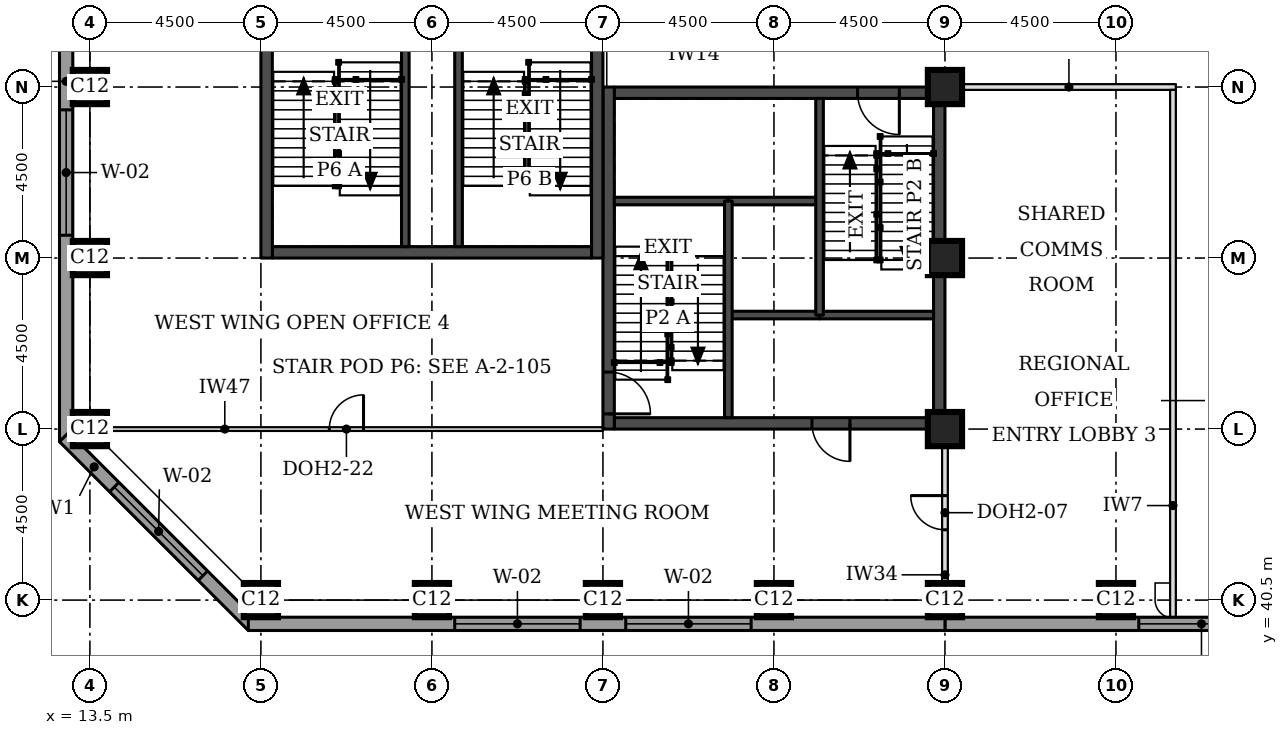
"""IFC4 building model, lengths in metres.
Left out: names, types, materials, properties, quantities, classifications, styles, units other than length and angle.
Written with IfcOpenShell. Run it as: python <this file> out.ifc"""

import sys

from ifc_helpers import new_model, si_unit, direction, frame, frame_2d, origin, origin_2d, place, context, subcontext, project, spatial, rectangle, extrude, element, fill, save


model = new_model("IFC4")
c1 = context("Model", 3, precision=1e-05, world=origin(), true_north=direction((0.0, 1.0)))
c2 = subcontext(c1, "Body", "Model", "MODEL_VIEW")
j1 = project(units=[si_unit("LENGTHUNIT", "METRE"), si_unit("PLANEANGLEUNIT", "RADIAN")], contexts=[c1])
p1 = place(None, origin())
s1 = spatial("IfcSite", under=j1, at=p1, CompositionType="ELEMENT")
p2 = place(p1, origin())
s2 = spatial("IfcBuilding", under=s1, at=p2, CompositionType="ELEMENT")
p3 = place(p2, frame((0.0, 0.0, 158.8)))
s3 = spatial("IfcBuildingStorey", under=s2, at=p3, CompositionType="ELEMENT", Elevation=158.8)
for number, where, z_axis, x_axis in (
    (1, (18.0, 40.5, 0.0), (0.0, 0.0, 1.0), (1.0, 0.0, 0.0)),
    (2, (22.5, 40.5, 0.0), (0.0, 0.0, 1.0), (1.0, 0.0, 0.0)),
    (3, (27.0, 40.5, 0.0), (0.0, 0.0, 1.0), (1.0, 0.0, 0.0)),
    (4, (31.5, 40.5, 0.0), (0.0, 0.0, 1.0), (1.0, 0.0, 0.0)),
    (5, (36.0, 40.5, 0.0), (0.0, 0.0, 1.0), (1.0, 0.0, 0.0)),
    (6, (40.5, 40.5, 0.0), (0.0, 0.0, 1.0), (1.0, 0.0, 0.0)),
    (7, (13.5, 45.0, 0.0), (0.0, 0.0, 1.0), (1.0, 0.0, 0.0)),
    (8, (36.0, 45.0, 0.0), (0.0, 0.0, 1.0), (1.0, 0.0, 0.0)),
    (9, (13.5, 49.5, 0.0), (0.0, 0.0, 1.0), (1.0, 0.0, 0.0)),
    (10, (36.0, 49.5, 0.0), (0.0, 0.0, 1.0), (1.0, 0.0, 0.0)),
    (11, (13.5, 54.0, 0.0), (0.0, 0.0, 1.0), (1.0, 0.0, 0.0)),
    (12, (36.0, 54.0, 0.0), (0.0, 0.0, 1.0), (1.0, 0.0, 0.0)),
):
    element("IfcColumn", number, at=place(p3, frame(where, z_axis=z_axis, x_axis=x_axis)), inside=s3, PredefinedType="COLUMN", context=c2, shape_type="SweptSolid", body=[
        extrude(rectangle(XDim=0.9, YDim=0.9, at=origin_2d()), origin(), (0.0, 0.0, 1.0), 3.7),
    ])
p4 = place(p3, frame((27.3, 45.15, 0.0), z_axis=(0.0, 0.0, 1.0), x_axis=(1.0, 0.0, 0.0)))
e13 = element("IfcWall", 13, at=p4, inside=s3, PredefinedType="SHEAR", context=c2, shape_type="SweptSolid", body=[
    extrude(rectangle(XDim=8.4, YDim=0.3, at=frame_2d((4.2, 0.0))), origin(), (0.0, 0.0, 1.0), 3.7),
])
p5 = place(p4, frame((5.2, 0.0, 0.0)))
e14 = element("IfcOpeningElement", 14, at=p5, cuts=e13, PredefinedType="OPENING", context=c2, shape_type="SweptSolid", body=[
    extrude(rectangle(XDim=1.0, YDim=2.1, at=frame_2d((0.5, 1.05))), frame((0.0, 0.16, 0.0), z_axis=(0.0, -1.0, 0.0), x_axis=(1.0, 0.0, 0.0)), (0.0, 0.0, 1.0), 0.32),
])
p6 = place(p3, frame((27.3, 53.85, 0.0), z_axis=(0.0, 0.0, 1.0), x_axis=(1.0, 0.0, 0.0)))
e15 = element("IfcWall", 15, at=p6, inside=s3, PredefinedType="SHEAR", context=c2, shape_type="SweptSolid", body=[
    extrude(rectangle(XDim=8.4, YDim=0.3, at=frame_2d((4.2, 0.0))), origin(), (0.0, 0.0, 1.0), 3.7),
])
p7 = place(p6, frame((6.4, 0.0, 0.0)))
e16 = element("IfcOpeningElement", 16, at=p7, cuts=e15, PredefinedType="OPENING", context=c2, shape_type="SweptSolid", body=[
    extrude(rectangle(XDim=1.1, YDim=2.1, at=frame_2d((0.55, 1.05))), frame((0.0, 0.16, 0.0), z_axis=(0.0, -1.0, 0.0), x_axis=(1.0, 0.0, 0.0)), (0.0, 0.0, 1.0), 0.32),
])
p8 = place(p3, frame((27.15, 45.0, 0.0), z_axis=(0.0, 0.0, 1.0), x_axis=(0.0, 1.0, 0.0)))
e17 = element("IfcWall", 17, at=p8, inside=s3, PredefinedType="SHEAR", context=c2, shape_type="SweptSolid", body=[
    extrude(rectangle(XDim=9.0, YDim=0.3, at=frame_2d((4.5, 0.0))), origin(), (0.0, 0.0, 1.0), 3.7),
])
p9 = place(p8, frame((0.4, 0.0, 0.0)))
e18 = element("IfcOpeningElement", 18, at=p9, cuts=e17, PredefinedType="OPENING", context=c2, shape_type="SweptSolid", body=[
    extrude(rectangle(XDim=1.1, YDim=2.1, at=frame_2d((0.55, 1.05))), frame((0.0, 0.16, 0.0), z_axis=(0.0, -1.0, 0.0), x_axis=(1.0, 0.0, 0.0)), (0.0, 0.0, 1.0), 0.32),
])
p10 = place(p3, frame((35.85, 45.0, 0.0), z_axis=(0.0, 0.0, 1.0), x_axis=(0.0, 1.0, 0.0)))
e19 = element("IfcWall", 19, at=p10, inside=s3, PredefinedType="SHEAR", context=c2, shape_type="SweptSolid", body=[
    extrude(rectangle(XDim=9.0, YDim=0.3, at=frame_2d((4.5, 0.0))), origin(), (0.0, 0.0, 1.0), 3.7),
])
p11 = place(p3, frame((18.3, 49.65, 0.0), z_axis=(0.0, 0.0, 1.0), x_axis=(1.0, 0.0, 0.0)))
e20 = element("IfcWall", 20, at=p11, inside=s3, PredefinedType="SHEAR", context=c2, shape_type="SweptSolid", body=[
    extrude(rectangle(XDim=8.4, YDim=0.3, at=frame_2d((4.2, 0.0))), origin(), (0.0, 0.0, 1.0), 3.7),
])
p12 = place(p3, frame((18.15, 49.5, 0.0), z_axis=(0.0, 0.0, 1.0), x_axis=(0.0, 1.0, 0.0)))
e21 = element("IfcWall", 21, at=p12, inside=s3, PredefinedType="SHEAR", context=c2, shape_type="SweptSolid", body=[
    extrude(rectangle(XDim=9.0, YDim=0.3, at=frame_2d((4.5, 0.0))), origin(), (0.0, 0.0, 1.0), 3.7),
])
p13 = place(p3, frame((26.85, 49.5, 0.0), z_axis=(0.0, 0.0, 1.0), x_axis=(0.0, 1.0, 0.0)))
e22 = element("IfcWall", 22, at=p13, inside=s3, PredefinedType="SHEAR", context=c2, shape_type="SweptSolid", body=[
    extrude(rectangle(XDim=9.0, YDim=0.3, at=frame_2d((4.5, 0.0))), origin(), (0.0, 0.0, 1.0), 3.7),
])
p14 = place(p13, frame((6.6, 0.0, 0.0)))
e23 = element("IfcOpeningElement", 23, at=p14, cuts=e22, PredefinedType="OPENING", context=c2, shape_type="SweptSolid", body=[
    extrude(rectangle(XDim=1.8, YDim=2.1, at=frame_2d((0.9, 1.05))), frame((0.0, 0.16, 0.0), z_axis=(0.0, -1.0, 0.0), x_axis=(1.0, 0.0, 0.0)), (0.0, 0.0, 1.0), 0.32),
])
p15 = place(p3, frame((36.0, 39.875, 0.0), z_axis=(0.0, 0.0, 1.0), x_axis=(1.0, 0.0, 0.0)))
e24 = element("IfcWall", 24, at=p15, inside=s3, PredefinedType="STANDARD", context=c2, shape_type="SweptSolid", body=[
    extrude(rectangle(XDim=36.331, YDim=0.35, at=frame_2d((18.166, 0.0))), origin(), (0.0, 0.0, 1.0), 3.525),
])
p16 = place(p15, frame((5.1, 0.0, 0.9)))
e25 = element("IfcOpeningElement", 25, at=p16, cuts=e24, PredefinedType="OPENING", context=c2, shape_type="SweptSolid", body=[
    extrude(rectangle(XDim=3.3, YDim=1.9, at=frame_2d((1.65, 0.95))), frame((0.0, 0.185, 0.0), z_axis=(0.0, -1.0, 0.0), x_axis=(1.0, 0.0, 0.0)), (0.0, 0.0, 1.0), 0.37),
])
p17 = place(p15, frame((9.6, 0.0, 0.9)))
e26 = element("IfcOpeningElement", 26, at=p17, cuts=e24, PredefinedType="OPENING", context=c2, shape_type="SweptSolid", body=[
    extrude(rectangle(XDim=3.3, YDim=1.9, at=frame_2d((1.65, 0.95))), frame((0.0, 0.185, 0.0), z_axis=(0.0, -1.0, 0.0), x_axis=(1.0, 0.0, 0.0)), (0.0, 0.0, 1.0), 0.37),
])
p18 = place(p15, frame((14.1, 0.0, 0.9)))
e27 = element("IfcOpeningElement", 27, at=p18, cuts=e24, PredefinedType="OPENING", context=c2, shape_type="SweptSolid", body=[
    extrude(rectangle(XDim=3.3, YDim=1.9, at=frame_2d((1.65, 0.95))), frame((0.0, 0.185, 0.0), z_axis=(0.0, -1.0, 0.0), x_axis=(1.0, 0.0, 0.0)), (0.0, 0.0, 1.0), 0.37),
])
p19 = place(p15, frame((18.6, 0.0, 0.9)))
e28 = element("IfcOpeningElement", 28, at=p19, cuts=e24, PredefinedType="OPENING", context=c2, shape_type="SweptSolid", body=[
    extrude(rectangle(XDim=3.3, YDim=1.9, at=frame_2d((1.65, 0.95))), frame((0.0, 0.185, 0.0), z_axis=(0.0, -1.0, 0.0), x_axis=(1.0, 0.0, 0.0)), (0.0, 0.0, 1.0), 0.37),
])
p20 = place(p15, frame((23.1, 0.0, 0.9)))
e29 = element("IfcOpeningElement", 29, at=p20, cuts=e24, PredefinedType="OPENING", context=c2, shape_type="SweptSolid", body=[
    extrude(rectangle(XDim=3.3, YDim=1.9, at=frame_2d((1.65, 0.95))), frame((0.0, 0.185, 0.0), z_axis=(0.0, -1.0, 0.0), x_axis=(1.0, 0.0, 0.0)), (0.0, 0.0, 1.0), 0.37),
])
p21 = place(p15, frame((27.6, 0.0, 0.9)))
e30 = element("IfcOpeningElement", 30, at=p21, cuts=e24, PredefinedType="OPENING", context=c2, shape_type="SweptSolid", body=[
    extrude(rectangle(XDim=3.3, YDim=1.9, at=frame_2d((1.65, 0.95))), frame((0.0, 0.185, 0.0), z_axis=(0.0, -1.0, 0.0), x_axis=(1.0, 0.0, 0.0)), (0.0, 0.0, 1.0), 0.37),
])
p22 = place(p3, frame((12.875, 58.831, 0.0), z_axis=(0.0, 0.0, 1.0), x_axis=(0.0, -1.0, 0.0)))
e31 = element("IfcWall", 31, at=p22, inside=s3, PredefinedType="STANDARD", context=c2, shape_type="SweptSolid", body=[
    extrude(rectangle(XDim=14.163, YDim=0.35, at=frame_2d((7.081, 0.0))), origin(), (0.0, 0.0, 1.0), 3.525),
])
p23 = place(p22, frame((5.431, 0.0, 0.9)))
e32 = element("IfcOpeningElement", 32, at=p23, cuts=e31, PredefinedType="OPENING", context=c2, shape_type="SweptSolid", body=[
    extrude(rectangle(XDim=3.3, YDim=1.9, at=frame_2d((1.65, 0.95))), frame((0.0, 0.185, 0.0), z_axis=(0.0, -1.0, 0.0), x_axis=(1.0, 0.0, 0.0)), (0.0, 0.0, 1.0), 0.37),
])
p24 = place(p3, frame((12.824, 44.792, 0.0), z_axis=(0.0, 0.0, 1.0), x_axis=(0.707106781187, -0.707106781187, 0.0)))
e33 = element("IfcWall", 33, at=p24, inside=s3, PredefinedType="STANDARD", context=c2, shape_type="SweptSolid", body=[
    extrude(rectangle(XDim=7.027, YDim=0.35, at=frame_2d((3.513, 0.0))), origin(), (0.0, 0.0, 1.0), 3.525),
])
p25 = place(p24, frame((1.863, 0.0, 0.9)))
e34 = element("IfcOpeningElement", 34, at=p25, cuts=e33, PredefinedType="OPENING", context=c2, shape_type="SweptSolid", body=[
    extrude(rectangle(XDim=3.3, YDim=1.9, at=frame_2d((1.65, 0.95))), frame((0.0, 0.185, 0.0), z_axis=(0.0, -1.0, 0.0), x_axis=(1.0, 0.0, 0.0)), (0.0, 0.0, 1.0), 0.37),
])
p26 = place(p3, frame((17.669, 39.875, 0.0), z_axis=(0.0, 0.0, 1.0), x_axis=(1.0, 0.0, 0.0)))
e35 = element("IfcWall", 35, at=p26, inside=s3, PredefinedType="STANDARD", context=c2, shape_type="SweptSolid", body=[
    extrude(rectangle(XDim=18.331, YDim=0.35, at=frame_2d((9.166, 0.0))), origin(), (0.0, 0.0, 1.0), 3.525),
])
p27 = place(p26, frame((5.431, 0.0, 0.9)))
e36 = element("IfcOpeningElement", 36, at=p27, cuts=e35, PredefinedType="OPENING", context=c2, shape_type="SweptSolid", body=[
    extrude(rectangle(XDim=3.3, YDim=1.9, at=frame_2d((1.65, 0.95))), frame((0.0, 0.185, 0.0), z_axis=(0.0, -1.0, 0.0), x_axis=(1.0, 0.0, 0.0)), (0.0, 0.0, 1.0), 0.37),
])
p28 = place(p26, frame((9.931, 0.0, 0.9)))
e37 = element("IfcOpeningElement", 37, at=p28, cuts=e35, PredefinedType="OPENING", context=c2, shape_type="SweptSolid", body=[
    extrude(rectangle(XDim=3.3, YDim=1.9, at=frame_2d((1.65, 0.95))), frame((0.0, 0.185, 0.0), z_axis=(0.0, -1.0, 0.0), x_axis=(1.0, 0.0, 0.0)), (0.0, 0.0, 1.0), 0.37),
])
p29 = place(p3, frame((36.45, 54.0, 0.0), z_axis=(0.0, 0.0, 1.0), x_axis=(1.0, 0.0, 0.0)))
e38 = element("IfcWall", 38, at=p29, inside=s3, PredefinedType="PARTITIONING", context=c2, shape_type="SweptSolid", body=[
    extrude(rectangle(XDim=5.625, YDim=0.15, at=frame_2d((2.812, 0.0))), origin(), (0.0, 0.0, 1.0), 3.55),
])
p30 = place(p3, frame((42.0, 40.05, 0.0), z_axis=(0.0, 0.0, 1.0), x_axis=(0.0, 1.0, 0.0)))
e39 = element("IfcWall", 39, at=p30, inside=s3, PredefinedType="PARTITIONING", context=c2, shape_type="SweptSolid", body=[
    extrude(rectangle(XDim=13.875, YDim=0.15, at=frame_2d((6.938, 0.0))), origin(), (0.0, 0.0, 1.0), 3.55),
])
p31 = place(p3, frame((36.0, 40.95, 0.0), z_axis=(0.0, 0.0, 1.0), x_axis=(0.0, 1.0, 0.0)))
e40 = element("IfcWall", 40, at=p31, inside=s3, PredefinedType="PARTITIONING", context=c2, shape_type="SweptSolid", body=[
    extrude(rectangle(XDim=3.63, YDim=0.15, at=frame_2d((1.815, 0.0))), origin(), (0.0, 0.0, 1.0), 2.8),
])
p32 = place(p31, frame((1.4, 0.0, 0.0)))
e41 = element("IfcOpeningElement", 41, at=p32, cuts=e40, PredefinedType="OPENING", context=c2, shape_type="SweptSolid", body=[
    extrude(rectangle(XDim=0.9, YDim=2.1, at=frame_2d((0.45, 1.05))), frame((0.0, 0.085, 0.0), z_axis=(0.0, -1.0, 0.0), x_axis=(1.0, 0.0, 0.0)), (0.0, 0.0, 1.0), 0.17),
])
p33 = place(p3, frame((13.5, 45.0, 0.0), z_axis=(0.0, 0.0, 1.0), x_axis=(1.0, 0.0, 0.0)))
e42 = element("IfcWall", 42, at=p33, inside=s3, PredefinedType="PARTITIONING", context=c2, shape_type="SweptSolid", body=[
    extrude(rectangle(XDim=13.5, YDim=0.1, at=frame_2d((6.75, 0.0))), origin(), (0.0, 0.0, 1.0), 2.55),
])
p34 = place(p33, frame((6.3, 0.0, 0.0)))
e43 = element("IfcOpeningElement", 43, at=p34, cuts=e42, PredefinedType="OPENING", context=c2, shape_type="SweptSolid", body=[
    extrude(rectangle(XDim=0.9, YDim=2.1, at=frame_2d((0.45, 1.05))), frame((0.0, 0.06, 0.0), z_axis=(0.0, -1.0, 0.0), x_axis=(1.0, 0.0, 0.0)), (0.0, 0.0, 1.0), 0.12),
])
p35 = place(p3, frame((30.3, 48.0, 0.0), z_axis=(0.0, 0.0, 1.0), x_axis=(1.0, 0.0, 0.0)))
e44 = element("IfcWall", 44, at=p35, inside=s3, PredefinedType="SOLIDWALL", context=c2, shape_type="SweptSolid", body=[
    extrude(rectangle(XDim=2.4, YDim=0.2, at=frame_2d((1.2, 0.0))), origin(), (0.0, 0.0, 1.0), 3.55),
])
p36 = place(p3, frame((32.7, 48.0, 0.0), z_axis=(0.0, 0.0, 1.0), x_axis=(1.0, 0.0, 0.0)))
e45 = element("IfcWall", 45, at=p36, inside=s3, PredefinedType="SOLIDWALL", context=c2, shape_type="SweptSolid", body=[
    extrude(rectangle(XDim=3.0, YDim=0.2, at=frame_2d((1.5, 0.0))), origin(), (0.0, 0.0, 1.0), 3.55),
])
p37 = place(p3, frame((30.3, 51.0, 0.0), z_axis=(0.0, 0.0, 1.0), x_axis=(1.0, 0.0, 0.0)))
e46 = element("IfcWall", 46, at=p37, inside=s3, PredefinedType="SOLIDWALL", context=c2, shape_type="SweptSolid", body=[
    extrude(rectangle(XDim=2.4, YDim=0.2, at=frame_2d((1.2, 0.0))), origin(), (0.0, 0.0, 1.0), 3.7),
])
p38 = place(p3, frame((27.3, 51.0, 0.0), z_axis=(0.0, 0.0, 1.0), x_axis=(1.0, 0.0, 0.0)))
e47 = element("IfcWall", 47, at=p38, inside=s3, PredefinedType="SOLIDWALL", context=c2, shape_type="SweptSolid", body=[
    extrude(rectangle(XDim=3.0, YDim=0.2, at=frame_2d((1.5, 0.0))), origin(), (0.0, 0.0, 1.0), 3.55),
])
for number, where, z_axis, x_axis in (
    (48, (30.3, 45.3, 0.0), (0.0, 0.0, 1.0), (0.0, 1.0, 0.0)),
    (49, (32.7, 48.0, 0.0), (0.0, 0.0, 1.0), (0.0, 1.0, 0.0)),
):
    element("IfcWall", number, at=place(p3, frame(where, z_axis=z_axis, x_axis=x_axis)), inside=s3, PredefinedType="SOLIDWALL", context=c2, shape_type="SweptSolid", body=[
        extrude(rectangle(XDim=5.7, YDim=0.2, at=frame_2d((2.85, 0.0))), origin(), (0.0, 0.0, 1.0), 3.55),
    ])
for number, where, z_axis, x_axis in (
    (50, (21.8, 49.8, 0.0), (0.0, 0.0, 1.0), (0.0, 1.0, 0.0)),
    (51, (23.2, 49.8, 0.0), (0.0, 0.0, 1.0), (0.0, 1.0, 0.0)),
):
    element("IfcWall", number, at=place(p3, frame(where, z_axis=z_axis, x_axis=x_axis)), inside=s3, PredefinedType="SOLIDWALL", context=c2, shape_type="SweptSolid", body=[
        extrude(rectangle(XDim=6.05, YDim=0.2, at=frame_2d((3.025, 0.0))), origin(), (0.0, 0.0, 1.0), 3.55),
    ])
p39 = place(p16, origin())
e52 = element("IfcWindow", 52, at=p39, inside=s3, PartitioningType="SINGLE_PANEL", PredefinedType="WINDOW", context=c2, shape_type="SweptSolid", body=[
    extrude(rectangle(XDim=3.3, YDim=1.9, at=frame_2d((1.65, 0.95))), frame((0.0, 0.085, 0.0), z_axis=(0.0, -1.0, 0.0), x_axis=(1.0, 0.0, 0.0)), (0.0, 0.0, 1.0), 0.06),
])
fill(e25, e52)
p40 = place(p23, origin())
e53 = element("IfcWindow", 53, at=p40, inside=s3, PartitioningType="SINGLE_PANEL", PredefinedType="WINDOW", context=c2, shape_type="SweptSolid", body=[
    extrude(rectangle(XDim=3.3, YDim=1.9, at=frame_2d((1.65, 0.95))), frame((0.0, 0.085, 0.0), z_axis=(0.0, -1.0, 0.0), x_axis=(1.0, 0.0, 0.0)), (0.0, 0.0, 1.0), 0.06),
])
fill(e32, e53)
p41 = place(p25, origin())
e54 = element("IfcWindow", 54, at=p41, inside=s3, PartitioningType="SINGLE_PANEL", PredefinedType="WINDOW", context=c2, shape_type="SweptSolid", body=[
    extrude(rectangle(XDim=3.3, YDim=1.9, at=frame_2d((1.65, 0.95))), frame((0.0, 0.085, 0.0), z_axis=(0.0, -1.0, 0.0), x_axis=(1.0, 0.0, 0.0)), (0.0, 0.0, 1.0), 0.06),
])
fill(e34, e54)
p42 = place(p27, origin())
e55 = element("IfcWindow", 55, at=p42, inside=s3, PartitioningType="SINGLE_PANEL", PredefinedType="WINDOW", context=c2, shape_type="SweptSolid", body=[
    extrude(rectangle(XDim=3.3, YDim=1.9, at=frame_2d((1.65, 0.95))), frame((0.0, 0.085, 0.0), z_axis=(0.0, -1.0, 0.0), x_axis=(1.0, 0.0, 0.0)), (0.0, 0.0, 1.0), 0.06),
])
fill(e36, e55)
p43 = place(p28, origin())
e56 = element("IfcWindow", 56, at=p43, inside=s3, PartitioningType="SINGLE_PANEL", PredefinedType="WINDOW", context=c2, shape_type="SweptSolid", body=[
    extrude(rectangle(XDim=3.3, YDim=1.9, at=frame_2d((1.65, 0.95))), frame((0.0, 0.085, 0.0), z_axis=(0.0, -1.0, 0.0), x_axis=(1.0, 0.0, 0.0)), (0.0, 0.0, 1.0), 0.06),
])
fill(e37, e56)
p44 = place(p32, origin())
e57 = element("IfcDoor", 57, at=p44, inside=s3, OperationType="SINGLE_SWING_RIGHT", PredefinedType="DOOR", context=c2, shape_type="SweptSolid", body=[
    extrude(rectangle(XDim=0.9, YDim=2.1, at=frame_2d((0.45, 1.05))), frame((0.0, 0.025, 0.0), z_axis=(0.0, -1.0, 0.0), x_axis=(1.0, 0.0, 0.0)), (0.0, 0.0, 1.0), 0.05),
])
fill(e41, e57)
p45 = place(p34, origin())
e58 = element("IfcDoor", 58, at=p45, inside=s3, OperationType="SINGLE_SWING_RIGHT", PredefinedType="DOOR", context=c2, shape_type="SweptSolid", body=[
    extrude(rectangle(XDim=0.9, YDim=2.1, at=frame_2d((0.45, 1.05))), frame((0.0, 0.025, 0.0), z_axis=(0.0, -1.0, 0.0), x_axis=(1.0, 0.0, 0.0)), (0.0, 0.0, 1.0), 0.05),
])
fill(e43, e58)
p46 = place(p9, frame((1.1, 0.0, 0.0), z_axis=(0.0, 0.0, 1.0), x_axis=(-1.0, 0.0, 0.0)))
e59 = element("IfcDoor", 59, at=p46, inside=s3, OperationType="SINGLE_SWING_RIGHT", PredefinedType="DOOR", context=c2, shape_type="SweptSolid", body=[
    extrude(rectangle(XDim=1.1, YDim=2.1, at=frame_2d((0.55, 1.05))), frame((0.0, 0.025, 0.0), z_axis=(0.0, -1.0, 0.0), x_axis=(1.0, 0.0, 0.0)), (0.0, 0.0, 1.0), 0.05),
])
fill(e18, e59)
p47 = place(p7, frame((1.1, 0.0, 0.0), z_axis=(0.0, 0.0, 1.0), x_axis=(-1.0, 0.0, 0.0)))
e60 = element("IfcDoor", 60, at=p47, inside=s3, OperationType="SINGLE_SWING_LEFT", PredefinedType="DOOR", context=c2, shape_type="SweptSolid", body=[
    extrude(rectangle(XDim=1.1, YDim=2.1, at=frame_2d((0.55, 1.05))), frame((0.0, 0.025, 0.0), z_axis=(0.0, -1.0, 0.0), x_axis=(1.0, 0.0, 0.0)), (0.0, 0.0, 1.0), 0.05),
])
fill(e16, e60)
p48 = place(p5, frame((1.0, 0.0, 0.0), z_axis=(0.0, 0.0, 1.0), x_axis=(-1.0, 0.0, 0.0)))
e61 = element("IfcDoor", 61, at=p48, inside=s3, OperationType="SINGLE_SWING_LEFT", PredefinedType="DOOR", context=c2, shape_type="SweptSolid", body=[
    extrude(rectangle(XDim=1.0, YDim=2.1, at=frame_2d((0.5, 1.05))), frame((0.0, 0.025, 0.0), z_axis=(0.0, -1.0, 0.0), x_axis=(1.0, 0.0, 0.0)), (0.0, 0.0, 1.0), 0.05),
])
fill(e14, e61)
save(model, sys.argv[1])
